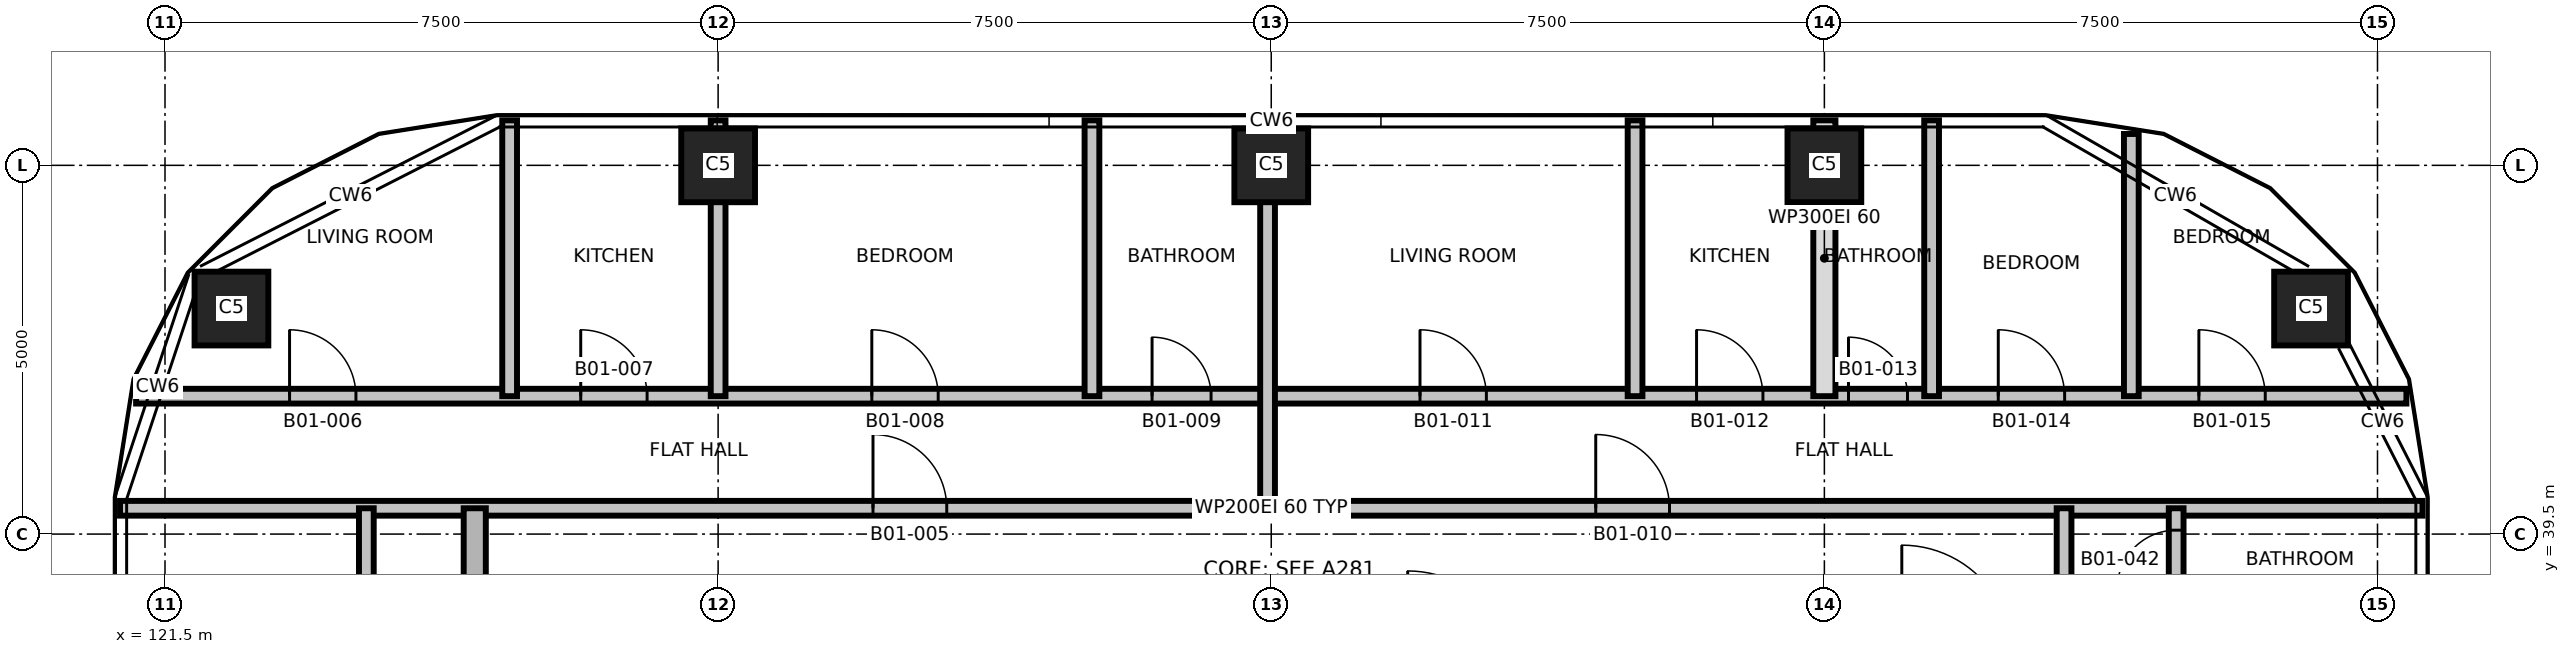
"""IFC4 building model, lengths in metres.
Left out: names, types, materials, properties, quantities, classifications, styles, units other than length and angle.
Written with IfcOpenShell. Run it as: python <this file> out.ifc"""

import sys

from ifc_helpers import new_model, si_unit, direction, frame, frame_2d, origin, origin_2d, place, context, subcontext, project, spatial, rectangle, extrude, element, fill, save


model = new_model("IFC4")
c1 = context("Model", 3, precision=1e-05, world=origin(), true_north=direction((0.0, 1.0)))
c2 = subcontext(c1, "Body", "Model", "MODEL_VIEW")
j1 = project(units=[si_unit("LENGTHUNIT", "METRE"), si_unit("PLANEANGLEUNIT", "RADIAN")], contexts=[c1])
p1 = place(None, origin())
s1 = spatial("IfcSite", under=j1, at=p1, CompositionType="ELEMENT")
p2 = place(p1, origin())
s2 = spatial("IfcBuilding", under=s1, at=p2, CompositionType="ELEMENT")
p3 = place(p2, frame((0.0, 0.0, 33.5)))
s3 = spatial("IfcBuildingStorey", under=s2, at=p3, CompositionType="ELEMENT", Elevation=33.5)
for number, where, z_axis, x_axis in (
    (1, (122.401, 42.558, 0.0), (0.0, 0.0, 1.0), (1.0, 0.0, 0.0)),
    (2, (150.599, 42.558, 0.0), (0.0, 0.0, 1.0), (1.0, 0.0, 0.0)),
    (3, (129.0, 44.5, 0.0), (0.0, 0.0, 1.0), (1.0, 0.0, 0.0)),
    (4, (136.5, 44.5, 0.0), (0.0, 0.0, 1.0), (1.0, 0.0, 0.0)),
    (5, (144.0, 44.5, 0.0), (0.0, 0.0, 1.0), (1.0, 0.0, 0.0)),
):
    element("IfcColumn", number, at=place(p3, frame(where, z_axis=z_axis, x_axis=x_axis)), inside=s3, PredefinedType="COLUMN", context=c2, shape_type="SweptSolid", body=[
        extrude(rectangle(XDim=1.0, YDim=1.0, at=origin_2d()), origin(), (0.0, 0.0, 1.0), 3.7),
    ])
p4 = place(p3, frame((120.89, 39.85, 0.0), z_axis=(0.0, 0.0, 1.0), x_axis=(1.0, 0.0, 0.0)))
e6 = element("IfcWall", 6, at=p4, inside=s3, PredefinedType="PARTITIONING", context=c2, shape_type="SweptSolid", body=[
    extrude(rectangle(XDim=31.22, YDim=0.2, at=frame_2d((15.61, 0.0))), origin(), (0.0, 0.0, 1.0), 3.4),
])
p5 = place(p4, frame((10.21, 0.0, 0.0)))
e7 = element("IfcOpeningElement", 7, at=p5, cuts=e6, PredefinedType="OPENING", context=c2, shape_type="SweptSolid", body=[
    extrude(rectangle(XDim=1.0, YDim=2.1, at=frame_2d((0.5, 1.05))), frame((0.0, 0.11, 0.0), z_axis=(0.0, -1.0, 0.0), x_axis=(1.0, 0.0, 0.0)), (0.0, 0.0, 1.0), 0.22),
])
p6 = place(p4, frame((20.01, 0.0, 0.0)))
e8 = element("IfcOpeningElement", 8, at=p6, cuts=e6, PredefinedType="OPENING", context=c2, shape_type="SweptSolid", body=[
    extrude(rectangle(XDim=1.0, YDim=2.1, at=frame_2d((0.5, 1.05))), frame((0.0, 0.11, 0.0), z_axis=(0.0, -1.0, 0.0), x_axis=(1.0, 0.0, 0.0)), (0.0, 0.0, 1.0), 0.22),
])
p7 = place(p3, frame((121.108, 41.37, 0.0), z_axis=(0.0, 0.0, 1.0), x_axis=(1.0, 0.0, 0.0)))
e9 = element("IfcWall", 9, at=p7, inside=s3, PredefinedType="PARTITIONING", context=c2, shape_type="SweptSolid", body=[
    extrude(rectangle(XDim=30.784, YDim=0.2, at=frame_2d((15.392, 0.0))), origin(), (0.0, 0.0, 1.0), 3.4),
])
p8 = place(p7, frame((2.081, 0.0, 0.0)))
e10 = element("IfcOpeningElement", 10, at=p8, cuts=e9, PredefinedType="OPENING", context=c2, shape_type="SweptSolid", body=[
    extrude(rectangle(XDim=0.9, YDim=2.1, at=frame_2d((0.45, 1.05))), frame((0.0, 0.11, 0.0), z_axis=(0.0, -1.0, 0.0), x_axis=(1.0, 0.0, 0.0)), (0.0, 0.0, 1.0), 0.22),
])
p9 = place(p7, frame((6.029, 0.0, 0.0)))
e11 = element("IfcOpeningElement", 11, at=p9, cuts=e9, PredefinedType="OPENING", context=c2, shape_type="SweptSolid", body=[
    extrude(rectangle(XDim=0.9, YDim=2.1, at=frame_2d((0.45, 1.05))), frame((0.0, 0.11, 0.0), z_axis=(0.0, -1.0, 0.0), x_axis=(1.0, 0.0, 0.0)), (0.0, 0.0, 1.0), 0.22),
])
p10 = place(p7, frame((9.976, 0.0, 0.0)))
e12 = element("IfcOpeningElement", 12, at=p10, cuts=e9, PredefinedType="OPENING", context=c2, shape_type="SweptSolid", body=[
    extrude(rectangle(XDim=0.9, YDim=2.1, at=frame_2d((0.45, 1.05))), frame((0.0, 0.11, 0.0), z_axis=(0.0, -1.0, 0.0), x_axis=(1.0, 0.0, 0.0)), (0.0, 0.0, 1.0), 0.22),
])
p11 = place(p7, frame((13.776, 0.0, 0.0)))
e13 = element("IfcOpeningElement", 13, at=p11, cuts=e9, PredefinedType="OPENING", context=c2, shape_type="SweptSolid", body=[
    extrude(rectangle(XDim=0.8, YDim=2.1, at=frame_2d((0.4, 1.05))), frame((0.0, 0.11, 0.0), z_axis=(0.0, -1.0, 0.0), x_axis=(1.0, 0.0, 0.0)), (0.0, 0.0, 1.0), 0.22),
])
p12 = place(p7, frame((17.409, 0.0, 0.0)))
e14 = element("IfcOpeningElement", 14, at=p12, cuts=e9, PredefinedType="OPENING", context=c2, shape_type="SweptSolid", body=[
    extrude(rectangle(XDim=0.9, YDim=2.1, at=frame_2d((0.45, 1.05))), frame((0.0, 0.11, 0.0), z_axis=(0.0, -1.0, 0.0), x_axis=(1.0, 0.0, 0.0)), (0.0, 0.0, 1.0), 0.22),
])
p13 = place(p7, frame((21.159, 0.0, 0.0)))
e15 = element("IfcOpeningElement", 15, at=p13, cuts=e9, PredefinedType="OPENING", context=c2, shape_type="SweptSolid", body=[
    extrude(rectangle(XDim=0.9, YDim=2.1, at=frame_2d((0.45, 1.05))), frame((0.0, 0.11, 0.0), z_axis=(0.0, -1.0, 0.0), x_axis=(1.0, 0.0, 0.0)), (0.0, 0.0, 1.0), 0.22),
])
p14 = place(p7, frame((23.219, 0.0, 0.0)))
e16 = element("IfcOpeningElement", 16, at=p14, cuts=e9, PredefinedType="OPENING", context=c2, shape_type="SweptSolid", body=[
    extrude(rectangle(XDim=0.8, YDim=2.1, at=frame_2d((0.4, 1.05))), frame((0.0, 0.11, 0.0), z_axis=(0.0, -1.0, 0.0), x_axis=(1.0, 0.0, 0.0)), (0.0, 0.0, 1.0), 0.22),
])
p15 = place(p7, frame((25.25, 0.0, 0.0)))
e17 = element("IfcOpeningElement", 17, at=p15, cuts=e9, PredefinedType="OPENING", context=c2, shape_type="SweptSolid", body=[
    extrude(rectangle(XDim=0.9, YDim=2.1, at=frame_2d((0.45, 1.05))), frame((0.0, 0.11, 0.0), z_axis=(0.0, -1.0, 0.0), x_axis=(1.0, 0.0, 0.0)), (0.0, 0.0, 1.0), 0.22),
])
p16 = place(p7, frame((27.97, 0.0, 0.0)))
e18 = element("IfcOpeningElement", 18, at=p16, cuts=e9, PredefinedType="OPENING", context=c2, shape_type="SweptSolid", body=[
    extrude(rectangle(XDim=0.9, YDim=2.1, at=frame_2d((0.45, 1.05))), frame((0.0, 0.11, 0.0), z_axis=(0.0, -1.0, 0.0), x_axis=(1.0, 0.0, 0.0)), (0.0, 0.0, 1.0), 0.22),
])
p17 = place(p3, frame((124.23, 22.15, 0.0), z_axis=(0.0, 0.0, 1.0), x_axis=(0.0, 1.0, 0.0)))
e19 = element("IfcWall", 19, at=p17, inside=s3, PredefinedType="PARTITIONING", context=c2, shape_type="SweptSolid", body=[
    extrude(rectangle(XDim=17.7, YDim=0.2, at=frame_2d((8.85, 0.0))), origin(), (0.0, 0.0, 1.0), 3.4),
])
p18 = place(p17, frame((1.028, 0.0, 0.0)))
e20 = element("IfcOpeningElement", 20, at=p18, cuts=e19, PredefinedType="OPENING", context=c2, shape_type="SweptSolid", body=[
    extrude(rectangle(XDim=0.9, YDim=2.1, at=frame_2d((0.45, 1.05))), frame((0.0, 0.11, 0.0), z_axis=(0.0, -1.0, 0.0), x_axis=(1.0, 0.0, 0.0)), (0.0, 0.0, 1.0), 0.22),
])
p19 = place(p17, frame((3.253, 0.0, 0.0)))
e21 = element("IfcOpeningElement", 21, at=p19, cuts=e19, PredefinedType="OPENING", context=c2, shape_type="SweptSolid", body=[
    extrude(rectangle(XDim=0.8, YDim=2.1, at=frame_2d((0.4, 1.05))), frame((0.0, 0.11, 0.0), z_axis=(0.0, -1.0, 0.0), x_axis=(1.0, 0.0, 0.0)), (0.0, 0.0, 1.0), 0.22),
])
p20 = place(p17, frame((6.867, 0.0, 0.0)))
e22 = element("IfcOpeningElement", 22, at=p20, cuts=e19, PredefinedType="OPENING", context=c2, shape_type="SweptSolid", body=[
    extrude(rectangle(XDim=0.9, YDim=2.1, at=frame_2d((0.45, 1.05))), frame((0.0, 0.11, 0.0), z_axis=(0.0, -1.0, 0.0), x_axis=(1.0, 0.0, 0.0)), (0.0, 0.0, 1.0), 0.22),
])
p21 = place(p17, frame((11.367, 0.0, 0.0)))
e23 = element("IfcOpeningElement", 23, at=p21, cuts=e19, PredefinedType="OPENING", context=c2, shape_type="SweptSolid", body=[
    extrude(rectangle(XDim=0.9, YDim=2.1, at=frame_2d((0.45, 1.05))), frame((0.0, 0.11, 0.0), z_axis=(0.0, -1.0, 0.0), x_axis=(1.0, 0.0, 0.0)), (0.0, 0.0, 1.0), 0.22),
])
p22 = place(p17, frame((15.075, 0.0, 0.0)))
e24 = element("IfcOpeningElement", 24, at=p22, cuts=e19, PredefinedType="OPENING", context=c2, shape_type="SweptSolid", body=[
    extrude(rectangle(XDim=0.9, YDim=2.1, at=frame_2d((0.45, 1.05))), frame((0.0, 0.11, 0.0), z_axis=(0.0, -1.0, 0.0), x_axis=(1.0, 0.0, 0.0)), (0.0, 0.0, 1.0), 0.22),
])
p23 = place(p3, frame((125.7, 22.15, 0.0), z_axis=(0.0, 0.0, 1.0), x_axis=(0.0, 1.0, 0.0)))
e25 = element("IfcWall", 25, at=p23, inside=s3, PredefinedType="SHEAR", context=c2, shape_type="SweptSolid", body=[
    extrude(rectangle(XDim=17.7, YDim=0.3, at=frame_2d((8.85, 0.0))), origin(), (0.0, 0.0, 1.0), 3.4),
])
p24 = place(p23, frame((2.7, 0.0, 0.0)))
e26 = element("IfcOpeningElement", 26, at=p24, cuts=e25, PredefinedType="OPENING", context=c2, shape_type="SweptSolid", body=[
    extrude(rectangle(XDim=1.0, YDim=2.1, at=frame_2d((0.5, 1.05))), frame((0.0, 0.16, 0.0), z_axis=(0.0, -1.0, 0.0), x_axis=(1.0, 0.0, 0.0)), (0.0, 0.0, 1.0), 0.32),
])
for number, where, z_axis, x_axis in (
    (27, (126.173, 41.37, 0.0), (0.0, 0.0, 1.0), (0.0, 1.0, 0.0)),
    (28, (129.0, 41.37, 0.0), (0.0, 0.0, 1.0), (0.0, 1.0, 0.0)),
    (29, (134.069, 41.37, 0.0), (0.0, 0.0, 1.0), (0.0, 1.0, 0.0)),
):
    element("IfcWall", number, at=place(p3, frame(where, z_axis=z_axis, x_axis=x_axis)), inside=s3, PredefinedType="PARTITIONING", context=c2, shape_type="SweptSolid", body=[
        extrude(rectangle(XDim=3.74, YDim=0.2, at=frame_2d((1.87, 0.0))), origin(), (0.0, 0.0, 1.0), 3.4),
    ])
p25 = place(p3, frame((136.45, 39.85, 0.0), z_axis=(0.0, 0.0, 1.0), x_axis=(0.0, 1.0, 0.0)))
e30 = element("IfcWall", 30, at=p25, inside=s3, PredefinedType="PARTITIONING", context=c2, shape_type="SweptSolid", body=[
    extrude(rectangle(XDim=5.26, YDim=0.2, at=frame_2d((2.63, 0.0))), origin(), (0.0, 0.0, 1.0), 3.4),
])
p26 = place(p3, frame((141.433, 41.37, 0.0), z_axis=(0.0, 0.0, 1.0), x_axis=(0.0, 1.0, 0.0)))
e31 = element("IfcWall", 31, at=p26, inside=s3, PredefinedType="PARTITIONING", context=c2, shape_type="SweptSolid", body=[
    extrude(rectangle(XDim=3.74, YDim=0.2, at=frame_2d((1.87, 0.0))), origin(), (0.0, 0.0, 1.0), 3.4),
])
p27 = place(p3, frame((144.0, 41.37, 0.0), z_axis=(0.0, 0.0, 1.0), x_axis=(0.0, 1.0, 0.0)))
e32 = element("IfcWall", 32, at=p27, inside=s3, PredefinedType="PARTITIONING", context=c2, shape_type="SweptSolid", body=[
    extrude(rectangle(XDim=3.74, YDim=0.3, at=frame_2d((1.87, 0.0))), origin(), (0.0, 0.0, 1.0), 3.4),
])
p28 = place(p3, frame((145.454, 41.37, 0.0), z_axis=(0.0, 0.0, 1.0), x_axis=(0.0, 1.0, 0.0)))
e33 = element("IfcWall", 33, at=p28, inside=s3, PredefinedType="PARTITIONING", context=c2, shape_type="SweptSolid", body=[
    extrude(rectangle(XDim=3.74, YDim=0.2, at=frame_2d((1.87, 0.0))), origin(), (0.0, 0.0, 1.0), 3.4),
])
p29 = place(p3, frame((147.25, 22.15, 0.0), z_axis=(0.0, 0.0, 1.0), x_axis=(0.0, 1.0, 0.0)))
e34 = element("IfcWall", 34, at=p29, inside=s3, PredefinedType="PARTITIONING", context=c2, shape_type="SweptSolid", body=[
    extrude(rectangle(XDim=17.7, YDim=0.2, at=frame_2d((8.85, 0.0))), origin(), (0.0, 0.0, 1.0), 3.4),
])
p30 = place(p29, frame((2.65, 0.0, 0.0)))
e35 = element("IfcOpeningElement", 35, at=p30, cuts=e34, PredefinedType="OPENING", context=c2, shape_type="SweptSolid", body=[
    extrude(rectangle(XDim=1.0, YDim=2.1, at=frame_2d((0.5, 1.05))), frame((0.0, 0.11, 0.0), z_axis=(0.0, -1.0, 0.0), x_axis=(1.0, 0.0, 0.0)), (0.0, 0.0, 1.0), 0.22),
])
p31 = place(p3, frame((148.162, 41.37, 0.0), z_axis=(0.0, 0.0, 1.0), x_axis=(0.0, 1.0, 0.0)))
e36 = element("IfcWall", 36, at=p31, inside=s3, PredefinedType="PARTITIONING", context=c2, shape_type="SweptSolid", body=[
    extrude(rectangle(XDim=3.555, YDim=0.2, at=frame_2d((1.777, 0.0))), origin(), (0.0, 0.0, 1.0), 3.4),
])
p32 = place(p3, frame((148.77, 22.15, 0.0), z_axis=(0.0, 0.0, 1.0), x_axis=(0.0, 1.0, 0.0)))
e37 = element("IfcWall", 37, at=p32, inside=s3, PredefinedType="PARTITIONING", context=c2, shape_type="SweptSolid", body=[
    extrude(rectangle(XDim=17.7, YDim=0.2, at=frame_2d((8.85, 0.0))), origin(), (0.0, 0.0, 1.0), 3.4),
])
p33 = place(p32, frame((1.725, 0.0, 0.0)))
e38 = element("IfcOpeningElement", 38, at=p33, cuts=e37, PredefinedType="OPENING", context=c2, shape_type="SweptSolid", body=[
    extrude(rectangle(XDim=0.9, YDim=2.1, at=frame_2d((0.45, 1.05))), frame((0.0, 0.11, 0.0), z_axis=(0.0, -1.0, 0.0), x_axis=(1.0, 0.0, 0.0)), (0.0, 0.0, 1.0), 0.22),
])
p34 = place(p32, frame((6.195, 0.0, 0.0)))
e39 = element("IfcOpeningElement", 39, at=p34, cuts=e37, PredefinedType="OPENING", context=c2, shape_type="SweptSolid", body=[
    extrude(rectangle(XDim=0.9, YDim=2.1, at=frame_2d((0.45, 1.05))), frame((0.0, 0.11, 0.0), z_axis=(0.0, -1.0, 0.0), x_axis=(1.0, 0.0, 0.0)), (0.0, 0.0, 1.0), 0.22),
])
p35 = place(p32, frame((9.641, 0.0, 0.0)))
e40 = element("IfcOpeningElement", 40, at=p35, cuts=e37, PredefinedType="OPENING", context=c2, shape_type="SweptSolid", body=[
    extrude(rectangle(XDim=0.9, YDim=2.1, at=frame_2d((0.45, 1.05))), frame((0.0, 0.11, 0.0), z_axis=(0.0, -1.0, 0.0), x_axis=(1.0, 0.0, 0.0)), (0.0, 0.0, 1.0), 0.22),
])
p36 = place(p32, frame((11.895, 0.0, 0.0)))
e41 = element("IfcOpeningElement", 41, at=p36, cuts=e37, PredefinedType="OPENING", context=c2, shape_type="SweptSolid", body=[
    extrude(rectangle(XDim=0.8, YDim=2.1, at=frame_2d((0.4, 1.05))), frame((0.0, 0.11, 0.0), z_axis=(0.0, -1.0, 0.0), x_axis=(1.0, 0.0, 0.0)), (0.0, 0.0, 1.0), 0.22),
])
p37 = place(p32, frame((14.378, 0.0, 0.0)))
e42 = element("IfcOpeningElement", 42, at=p37, cuts=e37, PredefinedType="OPENING", context=c2, shape_type="SweptSolid", body=[
    extrude(rectangle(XDim=0.9, YDim=2.1, at=frame_2d((0.45, 1.05))), frame((0.0, 0.11, 0.0), z_axis=(0.0, -1.0, 0.0), x_axis=(1.0, 0.0, 0.0)), (0.0, 0.0, 1.0), 0.22),
])
p38 = place(p32, frame((16.603, 0.0, 0.0)))
e43 = element("IfcOpeningElement", 43, at=p38, cuts=e37, PredefinedType="OPENING", context=c2, shape_type="SweptSolid", body=[
    extrude(rectangle(XDim=0.8, YDim=2.1, at=frame_2d((0.4, 1.05))), frame((0.0, 0.11, 0.0), z_axis=(0.0, -1.0, 0.0), x_axis=(1.0, 0.0, 0.0)), (0.0, 0.0, 1.0), 0.22),
])
p39 = place(p5, origin())
e44 = element("IfcDoor", 44, at=p39, inside=s3, OperationType="SINGLE_SWING_LEFT", PredefinedType="DOOR", context=c2, shape_type="SweptSolid", body=[
    extrude(rectangle(XDim=1.0, YDim=2.1, at=frame_2d((0.5, 1.05))), frame((0.0, 0.025, 0.0), z_axis=(0.0, -1.0, 0.0), x_axis=(1.0, 0.0, 0.0)), (0.0, 0.0, 1.0), 0.05),
])
fill(e7, e44)
p40 = place(p8, origin())
e45 = element("IfcDoor", 45, at=p40, inside=s3, OperationType="SINGLE_SWING_RIGHT", PredefinedType="DOOR", context=c2, shape_type="SweptSolid", body=[
    extrude(rectangle(XDim=0.9, YDim=2.1, at=frame_2d((0.45, 1.05))), frame((0.0, 0.025, 0.0), z_axis=(0.0, -1.0, 0.0), x_axis=(1.0, 0.0, 0.0)), (0.0, 0.0, 1.0), 0.05),
])
fill(e10, e45)
p41 = place(p9, origin())
e46 = element("IfcDoor", 46, at=p41, inside=s3, OperationType="SINGLE_SWING_LEFT", PredefinedType="DOOR", context=c2, shape_type="SweptSolid", body=[
    extrude(rectangle(XDim=0.9, YDim=2.1, at=frame_2d((0.45, 1.05))), frame((0.0, 0.025, 0.0), z_axis=(0.0, -1.0, 0.0), x_axis=(1.0, 0.0, 0.0)), (0.0, 0.0, 1.0), 0.05),
])
fill(e11, e46)
p42 = place(p10, origin())
e47 = element("IfcDoor", 47, at=p42, inside=s3, OperationType="SINGLE_SWING_RIGHT", PredefinedType="DOOR", context=c2, shape_type="SweptSolid", body=[
    extrude(rectangle(XDim=0.9, YDim=2.1, at=frame_2d((0.45, 1.05))), frame((0.0, 0.025, 0.0), z_axis=(0.0, -1.0, 0.0), x_axis=(1.0, 0.0, 0.0)), (0.0, 0.0, 1.0), 0.05),
])
fill(e12, e47)
p43 = place(p11, origin())
e48 = element("IfcDoor", 48, at=p43, inside=s3, OperationType="SINGLE_SWING_LEFT", PredefinedType="DOOR", context=c2, shape_type="SweptSolid", body=[
    extrude(rectangle(XDim=0.8, YDim=2.1, at=frame_2d((0.4, 1.05))), frame((0.0, 0.025, 0.0), z_axis=(0.0, -1.0, 0.0), x_axis=(1.0, 0.0, 0.0)), (0.0, 0.0, 1.0), 0.05),
])
fill(e13, e48)
p44 = place(p6, origin())
e49 = element("IfcDoor", 49, at=p44, inside=s3, OperationType="SINGLE_SWING_RIGHT", PredefinedType="DOOR", context=c2, shape_type="SweptSolid", body=[
    extrude(rectangle(XDim=1.0, YDim=2.1, at=frame_2d((0.5, 1.05))), frame((0.0, 0.025, 0.0), z_axis=(0.0, -1.0, 0.0), x_axis=(1.0, 0.0, 0.0)), (0.0, 0.0, 1.0), 0.05),
])
fill(e8, e49)
p45 = place(p12, origin())
e50 = element("IfcDoor", 50, at=p45, inside=s3, OperationType="SINGLE_SWING_LEFT", PredefinedType="DOOR", context=c2, shape_type="SweptSolid", body=[
    extrude(rectangle(XDim=0.9, YDim=2.1, at=frame_2d((0.45, 1.05))), frame((0.0, 0.025, 0.0), z_axis=(0.0, -1.0, 0.0), x_axis=(1.0, 0.0, 0.0)), (0.0, 0.0, 1.0), 0.05),
])
fill(e14, e50)
p46 = place(p13, origin())
e51 = element("IfcDoor", 51, at=p46, inside=s3, OperationType="SINGLE_SWING_RIGHT", PredefinedType="DOOR", context=c2, shape_type="SweptSolid", body=[
    extrude(rectangle(XDim=0.9, YDim=2.1, at=frame_2d((0.45, 1.05))), frame((0.0, 0.025, 0.0), z_axis=(0.0, -1.0, 0.0), x_axis=(1.0, 0.0, 0.0)), (0.0, 0.0, 1.0), 0.05),
])
fill(e15, e51)
p47 = place(p14, origin())
e52 = element("IfcDoor", 52, at=p47, inside=s3, OperationType="SINGLE_SWING_LEFT", PredefinedType="DOOR", context=c2, shape_type="SweptSolid", body=[
    extrude(rectangle(XDim=0.8, YDim=2.1, at=frame_2d((0.4, 1.05))), frame((0.0, 0.025, 0.0), z_axis=(0.0, -1.0, 0.0), x_axis=(1.0, 0.0, 0.0)), (0.0, 0.0, 1.0), 0.05),
])
fill(e16, e52)
p48 = place(p15, origin())
e53 = element("IfcDoor", 53, at=p48, inside=s3, OperationType="SINGLE_SWING_RIGHT", PredefinedType="DOOR", context=c2, shape_type="SweptSolid", body=[
    extrude(rectangle(XDim=0.9, YDim=2.1, at=frame_2d((0.45, 1.05))), frame((0.0, 0.025, 0.0), z_axis=(0.0, -1.0, 0.0), x_axis=(1.0, 0.0, 0.0)), (0.0, 0.0, 1.0), 0.05),
])
fill(e17, e53)
p49 = place(p16, origin())
e54 = element("IfcDoor", 54, at=p49, inside=s3, OperationType="SINGLE_SWING_LEFT", PredefinedType="DOOR", context=c2, shape_type="SweptSolid", body=[
    extrude(rectangle(XDim=0.9, YDim=2.1, at=frame_2d((0.45, 1.05))), frame((0.0, 0.025, 0.0), z_axis=(0.0, -1.0, 0.0), x_axis=(1.0, 0.0, 0.0)), (0.0, 0.0, 1.0), 0.05),
])
fill(e18, e54)
p50 = place(p38, origin())
e55 = element("IfcDoor", 55, at=p50, inside=s3, OperationType="SINGLE_SWING_RIGHT", PredefinedType="DOOR", context=c2, shape_type="SweptSolid", body=[
    extrude(rectangle(XDim=0.8, YDim=2.1, at=frame_2d((0.4, 1.05))), frame((0.0, 0.025, 0.0), z_axis=(0.0, -1.0, 0.0), x_axis=(1.0, 0.0, 0.0)), (0.0, 0.0, 1.0), 0.05),
])
fill(e43, e55)
save(model, sys.argv[1])
